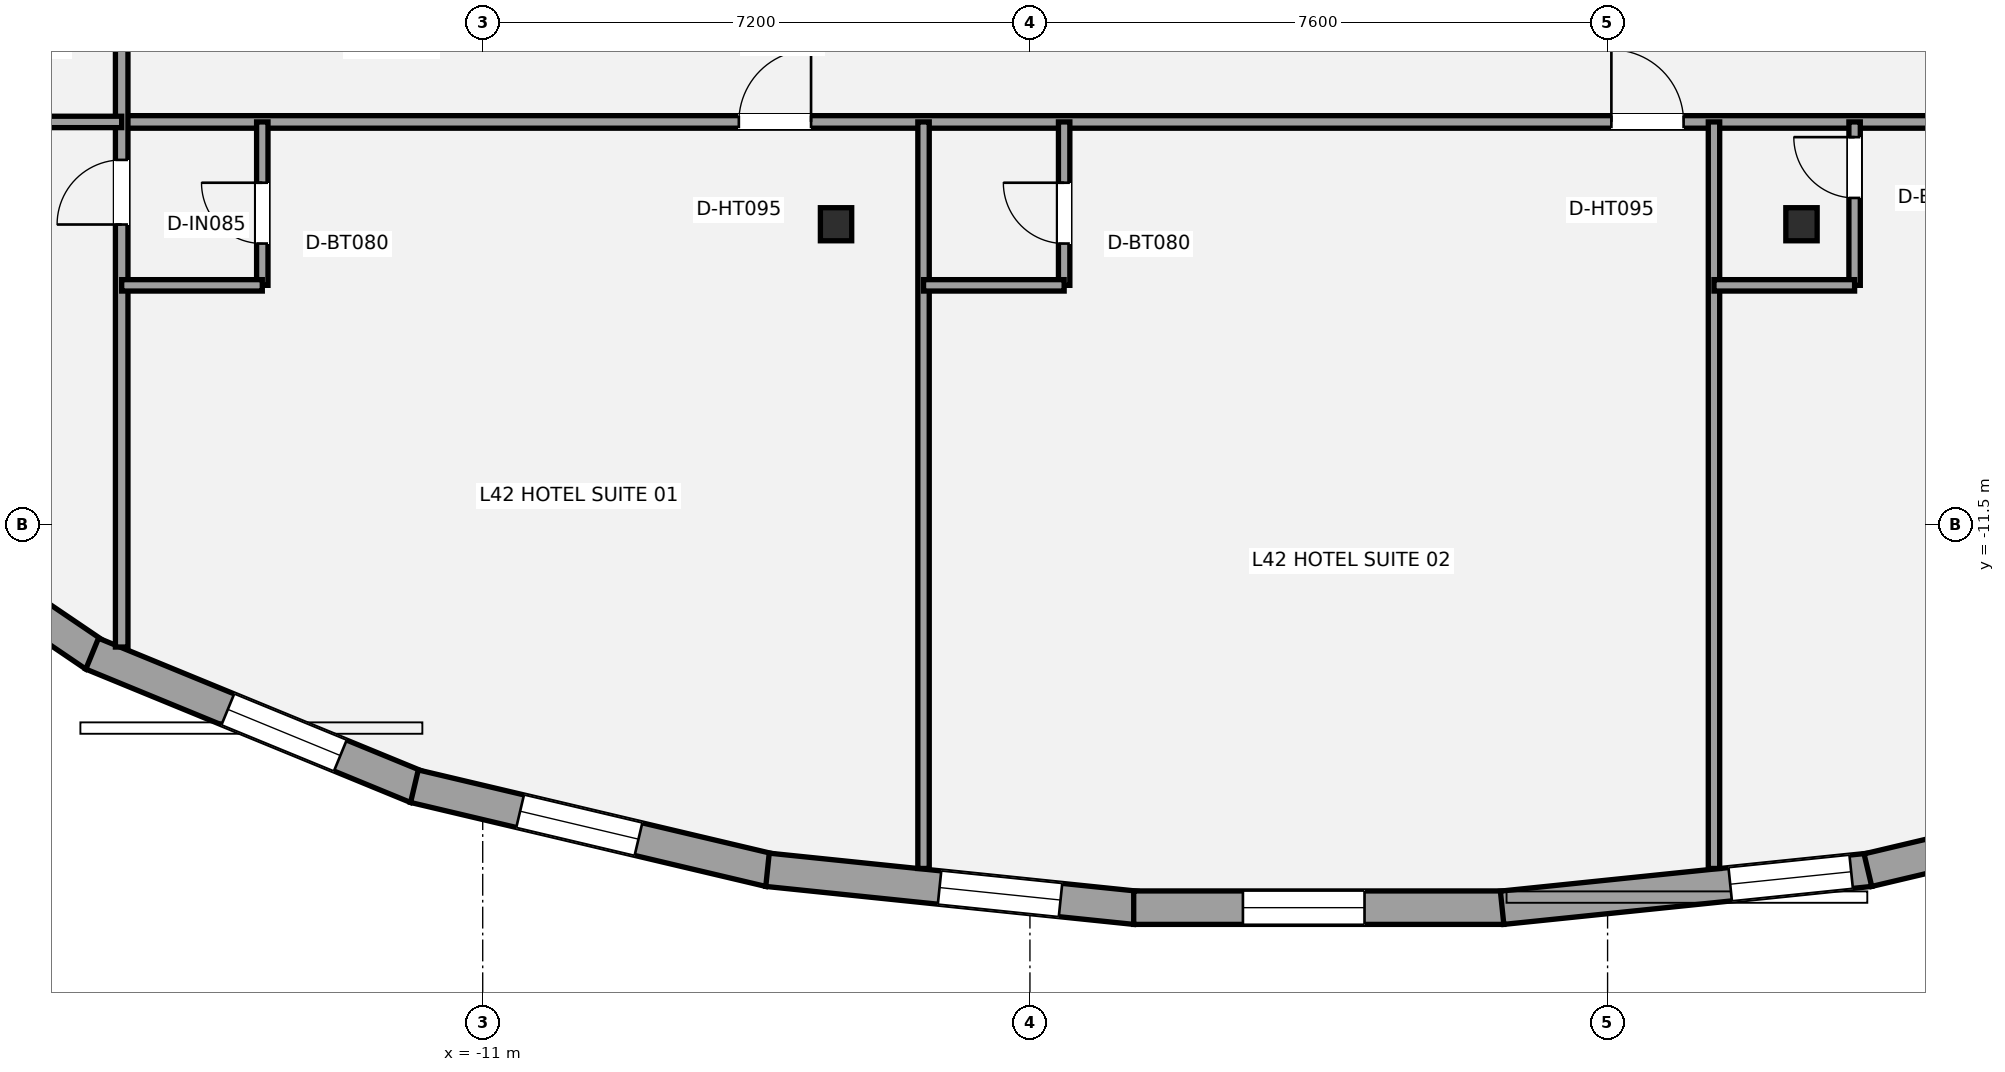
"""IFC4 building model, lengths in metres.
Left out: names, types, materials, properties, quantities, classifications, styles, units other than length and angle.
Written with IfcOpenShell. Run it as: python <this file> out.ifc"""

import sys

from ifc_helpers import new_model, si_unit, direction, frame, frame_2d, origin, origin_2d, place, context, subcontext, project, spatial, rectangle, i_section, extrude, element, fill, save


model = new_model("IFC4")
c1 = context("Model", 3, precision=1e-05, world=origin(), true_north=direction((0.0, 1.0)))
c2 = subcontext(c1, "Body", "Model", "MODEL_VIEW")
j1 = project(units=[si_unit("LENGTHUNIT", "METRE"), si_unit("PLANEANGLEUNIT", "RADIAN")], contexts=[c1])
p1 = place(None, origin())
s1 = spatial("IfcSite", under=j1, at=p1, CompositionType="ELEMENT")
p2 = place(p1, origin())
s2 = spatial("IfcBuilding", under=s1, at=p2, CompositionType="ELEMENT")
p3 = place(p2, frame((0.0, 0.0, 156.6)))
s3 = spatial("IfcBuildingStorey", under=s2, at=p3, CompositionType="ELEMENT", Elevation=156.6)
for number, where, z_axis, x_axis in (
    (1, (-6.351, -7.546, 0.0), (0.0, 0.0, 1.0), (1.0, 0.0, 0.0)),
    (2, (6.351, -7.546, 0.0), (0.0, 0.0, 1.0), (1.0, 0.0, 0.0)),
):
    element("IfcColumn", number, at=place(p3, frame(where, z_axis=z_axis, x_axis=x_axis)), inside=s3, PredefinedType="COLUMN", context=c2, shape_type="SweptSolid", body=[
        extrude(i_section(OverallWidth=0.412, OverallDepth=0.435, WebThickness=0.036, FlangeThickness=0.057, at=origin_2d()), origin(), (0.0, 0.0, 1.0), 3.2),
    ])
p4 = place(p3, frame((-16.099, -13.217, 0.0), z_axis=(0.0, 0.0, 1.0), x_axis=(-0.827771778383, 0.561064954272, 0.0)))
e3 = element("IfcWall", 3, at=p4, inside=s3, PredefinedType="STANDARD", context=c2, shape_type="SweptSolid", body=[
    extrude(rectangle(XDim=4.282, YDim=0.44, at=frame_2d((2.141, 0.0))), origin(), (0.0, 0.0, 1.0), 2.315),
])
p5 = place(p4, frame((1.54, 0.0, 0.58)))
e4 = element("IfcOpeningElement", 4, at=p5, cuts=e3, PredefinedType="OPENING", context=c2, shape_type="SweptSolid", body=[
    extrude(rectangle(XDim=1.6, YDim=1.55, at=frame_2d((0.8, 0.775))), frame((0.0, 0.23, 0.0), z_axis=(0.0, -1.0, 0.0), x_axis=(1.0, 0.0, 0.0)), (0.0, 0.0, 1.0), 0.46),
])
p6 = place(p3, frame((-11.865, -14.95, 0.0), z_axis=(0.0, 0.0, 1.0), x_axis=(-0.925044361302, 0.3798590918, 0.0)))
e5 = element("IfcWall", 5, at=p6, inside=s3, PredefinedType="STANDARD", context=c2, shape_type="SweptSolid", body=[
    extrude(rectangle(XDim=4.619, YDim=0.44, at=frame_2d((2.31, 0.0))), origin(), (0.0, 0.0, 1.0), 2.315),
])
p7 = place(p6, frame((1.09, 0.0, 0.58)))
e6 = element("IfcOpeningElement", 6, at=p7, cuts=e5, PredefinedType="OPENING", context=c2, shape_type="SweptSolid", body=[
    extrude(rectangle(XDim=1.6, YDim=1.55, at=frame_2d((0.8, 0.775))), frame((0.0, 0.23, 0.0), z_axis=(0.0, -1.0, 0.0), x_axis=(1.0, 0.0, 0.0)), (0.0, 0.0, 1.0), 0.46),
])
p8 = place(p3, frame((-7.225, -16.044, 0.0), z_axis=(0.0, 0.0, 1.0), x_axis=(-0.973201371538, 0.229954539936, 0.0)))
e7 = element("IfcWall", 7, at=p8, inside=s3, PredefinedType="STANDARD", context=c2, shape_type="SweptSolid", body=[
    extrude(rectangle(XDim=4.802, YDim=0.44, at=frame_2d((2.401, 0.0))), origin(), (0.0, 0.0, 1.0), 2.315),
])
p9 = place(p8, frame((1.773, 0.0, 0.58)))
e8 = element("IfcOpeningElement", 8, at=p9, cuts=e7, PredefinedType="OPENING", context=c2, shape_type="SweptSolid", body=[
    extrude(rectangle(XDim=1.6, YDim=1.55, at=frame_2d((0.8, 0.775))), frame((0.0, 0.23, 0.0), z_axis=(0.0, -1.0, 0.0), x_axis=(1.0, 0.0, 0.0)), (0.0, 0.0, 1.0), 0.46),
])
p10 = place(p3, frame((-2.412, -16.539, 0.0), z_axis=(0.0, 0.0, 1.0), x_axis=(-0.994718319881, 0.10264240884, 0.0)))
e9 = element("IfcWall", 9, at=p10, inside=s3, PredefinedType="STANDARD", context=c2, shape_type="SweptSolid", body=[
    extrude(rectangle(XDim=4.866, YDim=0.44, at=frame_2d((2.433, 0.0))), origin(), (0.0, 0.0, 1.0), 2.315),
])
p11 = place(p10, frame((0.991, 0.0, 0.58)))
e10 = element("IfcOpeningElement", 10, at=p11, cuts=e9, PredefinedType="OPENING", context=c2, shape_type="SweptSolid", body=[
    extrude(rectangle(XDim=1.6, YDim=1.55, at=frame_2d((0.8, 0.775))), frame((0.0, 0.23, 0.0), z_axis=(0.0, -1.0, 0.0), x_axis=(1.0, 0.0, 0.0)), (0.0, 0.0, 1.0), 0.46),
])
p12 = place(p3, frame((2.435, -16.537, 0.0), z_axis=(0.0, 0.0, 1.0), x_axis=(-1.0, 0.0, 0.0)))
e11 = element("IfcWall", 11, at=p12, inside=s3, PredefinedType="STANDARD", context=c2, shape_type="SweptSolid", body=[
    extrude(rectangle(XDim=4.87, YDim=0.44, at=frame_2d((2.435, 0.0))), origin(), (0.0, 0.0, 1.0), 2.315),
])
p13 = place(p12, frame((1.833, 0.0, 0.58)))
e12 = element("IfcOpeningElement", 12, at=p13, cuts=e11, PredefinedType="OPENING", context=c2, shape_type="SweptSolid", body=[
    extrude(rectangle(XDim=1.6, YDim=1.55, at=frame_2d((0.8, 0.775))), frame((0.0, 0.23, 0.0), z_axis=(0.0, -1.0, 0.0), x_axis=(1.0, 0.0, 0.0)), (0.0, 0.0, 1.0), 0.46),
])
p14 = place(p3, frame((7.253, -16.039, 0.0), z_axis=(0.0, 0.0, 1.0), x_axis=(-0.994718319881, -0.10264240884, 0.0)))
e13 = element("IfcWall", 13, at=p14, inside=s3, PredefinedType="STANDARD", context=c2, shape_type="SweptSolid", body=[
    extrude(rectangle(XDim=4.866, YDim=0.44, at=frame_2d((2.433, 0.0))), origin(), (0.0, 0.0, 1.0), 2.315),
])
p15 = place(p14, frame((0.25, 0.0, 0.58)))
e14 = element("IfcOpeningElement", 14, at=p15, cuts=e13, PredefinedType="OPENING", context=c2, shape_type="SweptSolid", body=[
    extrude(rectangle(XDim=1.6, YDim=1.55, at=frame_2d((0.8, 0.775))), frame((0.0, 0.23, 0.0), z_axis=(0.0, -1.0, 0.0), x_axis=(1.0, 0.0, 0.0)), (0.0, 0.0, 1.0), 0.46),
])
p16 = place(p3, frame((11.898, -14.939, 0.0), z_axis=(0.0, 0.0, 1.0), x_axis=(-0.973201371538, -0.229954539936, 0.0)))
e15 = element("IfcWall", 15, at=p16, inside=s3, PredefinedType="STANDARD", context=c2, shape_type="SweptSolid", body=[
    extrude(rectangle(XDim=4.802, YDim=0.44, at=frame_2d((2.401, 0.0))), origin(), (0.0, 0.0, 1.0), 2.315),
])
p17 = place(p16, frame((1.921, 0.0, 0.58)))
e16 = element("IfcOpeningElement", 16, at=p17, cuts=e15, PredefinedType="OPENING", context=c2, shape_type="SweptSolid", body=[
    extrude(rectangle(XDim=1.6, YDim=1.55, at=frame_2d((0.8, 0.775))), frame((0.0, 0.23, 0.0), z_axis=(0.0, -1.0, 0.0), x_axis=(1.0, 0.0, 0.0)), (0.0, 0.0, 1.0), 0.46),
])
p18 = place(p3, frame((-15.75, -6.2, 0.0), z_axis=(0.0, 0.0, 1.0), x_axis=(1.0, 0.0, 0.0)))
e17 = element("IfcWall", 17, at=p18, inside=s3, PredefinedType="PARTITIONING", context=c2, shape_type="SweptSolid", body=[
    extrude(rectangle(XDim=31.3, YDim=0.165, at=frame_2d((15.65, 0.0))), origin(), (0.0, 0.0, 1.0), 2.398),
])
p19 = place(p18, frame((8.12, 0.0, 0.0)))
e18 = element("IfcOpeningElement", 18, at=p19, cuts=e17, PredefinedType="OPENING", context=c2, shape_type="SweptSolid", body=[
    extrude(rectangle(XDim=0.95, YDim=2.15, at=frame_2d((0.475, 1.075))), frame((0.0, 0.093, 0.0), z_axis=(0.0, -1.0, 0.0), x_axis=(1.0, 0.0, 0.0)), (0.0, 0.0, 1.0), 0.185),
])
p20 = place(p18, frame((19.6, 0.0, 0.0)))
e19 = element("IfcOpeningElement", 19, at=p20, cuts=e17, PredefinedType="OPENING", context=c2, shape_type="SweptSolid", body=[
    extrude(rectangle(XDim=0.95, YDim=2.15, at=frame_2d((0.475, 1.075))), frame((0.0, 0.093, 0.0), z_axis=(0.0, -1.0, 0.0), x_axis=(1.0, 0.0, 0.0)), (0.0, 0.0, 1.0), 0.185),
])
p21 = place(p18, frame((29.95, 0.0, 0.0)))
e20 = element("IfcOpeningElement", 20, at=p21, cuts=e17, PredefinedType="OPENING", context=c2, shape_type="SweptSolid", body=[
    extrude(rectangle(XDim=0.95, YDim=2.15, at=frame_2d((0.475, 1.075))), frame((0.0, 0.093, 0.0), z_axis=(0.0, -1.0, 0.0), x_axis=(1.0, 0.0, 0.0)), (0.0, 0.0, 1.0), 0.185),
])
p22 = place(p3, frame((-15.75, -13.108, 0.0), z_axis=(0.0, 0.0, 1.0), x_axis=(0.0, 1.0, 0.0)))
e21 = element("IfcWall", 21, at=p22, inside=s3, PredefinedType="PARTITIONING", context=c2, shape_type="SweptSolid", body=[
    extrude(rectangle(XDim=20.658, YDim=0.165, at=frame_2d((10.329, 0.0))), origin(), (0.0, 0.0, 1.0), 2.473),
])
p23 = place(p22, frame((5.559, 0.0, 0.0)))
e22 = element("IfcOpeningElement", 22, at=p23, cuts=e21, PredefinedType="OPENING", context=c2, shape_type="SweptSolid", body=[
    extrude(rectangle(XDim=0.85, YDim=2.1, at=frame_2d((0.425, 1.05))), frame((0.0, 0.093, 0.0), z_axis=(0.0, -1.0, 0.0), x_axis=(1.0, 0.0, 0.0)), (0.0, 0.0, 1.0), 0.185),
])
p24 = place(p22, frame((9.959, 0.0, 0.0)))
e23 = element("IfcOpeningElement", 23, at=p24, cuts=e21, PredefinedType="OPENING", context=c2, shape_type="SweptSolid", body=[
    extrude(rectangle(XDim=0.95, YDim=2.15, at=frame_2d((0.475, 1.075))), frame((0.0, 0.093, 0.0), z_axis=(0.0, -1.0, 0.0), x_axis=(1.0, 0.0, 0.0)), (0.0, 0.0, 1.0), 0.185),
])
p25 = place(p22, frame((14.559, 0.0, 0.0)))
e24 = element("IfcOpeningElement", 24, at=p25, cuts=e21, PredefinedType="OPENING", context=c2, shape_type="SweptSolid", body=[
    extrude(rectangle(XDim=0.95, YDim=2.15, at=frame_2d((0.475, 1.075))), frame((0.0, 0.093, 0.0), z_axis=(0.0, -1.0, 0.0), x_axis=(1.0, 0.0, 0.0)), (0.0, 0.0, 1.0), 0.185),
])
p26 = place(p22, frame((19.309, 0.0, 0.0)))
e25 = element("IfcOpeningElement", 25, at=p26, cuts=e21, PredefinedType="OPENING", context=c2, shape_type="SweptSolid", body=[
    extrude(rectangle(XDim=0.95, YDim=2.15, at=frame_2d((0.475, 1.075))), frame((0.0, 0.093, 0.0), z_axis=(0.0, -1.0, 0.0), x_axis=(1.0, 0.0, 0.0)), (0.0, 0.0, 1.0), 0.185),
])
p27 = place(p3, frame((-22.828, -6.2, 0.0), z_axis=(0.0, 0.0, 1.0), x_axis=(1.0, 0.0, 0.0)))
e26 = element("IfcWall", 26, at=p27, inside=s3, PredefinedType="PLUMBINGWALL", context=c2, shape_type="SweptSolid", body=[
    extrude(rectangle(XDim=7.078, YDim=0.15, at=frame_2d((3.539, 0.0))), origin(), (0.0, 0.0, 1.0), 2.473),
])
for number, where, z_axis, x_axis in (
    (27, (-5.2, -16.022, 0.0), (0.0, 0.0, 1.0), (0.0, 1.0, 0.0)),
    (28, (5.2, -16.022, 0.0), (0.0, 0.0, 1.0), (0.0, 1.0, 0.0)),
):
    element("IfcWall", number, at=place(p3, frame(where, z_axis=z_axis, x_axis=x_axis)), inside=s3, PredefinedType="PLUMBINGWALL", context=c2, shape_type="SweptSolid", body=[
        extrude(rectangle(XDim=9.822, YDim=0.15, at=frame_2d((4.911, 0.0))), origin(), (0.0, 0.0, 1.0), 2.473),
    ])
p28 = place(p3, frame((-13.9, -8.35, 0.0), z_axis=(0.0, 0.0, 1.0), x_axis=(0.0, 1.0, 0.0)))
e29 = element("IfcWall", 29, at=p28, inside=s3, PredefinedType="PLUMBINGWALL", context=c2, shape_type="SweptSolid", body=[
    extrude(rectangle(XDim=2.15, YDim=0.15, at=frame_2d((1.075, 0.0))), origin(), (0.0, 0.0, 1.0), 3.02),
])
p29 = place(p28, frame((0.55, 0.0, 0.0)))
e30 = element("IfcOpeningElement", 30, at=p29, cuts=e29, PredefinedType="OPENING", context=c2, shape_type="SweptSolid", body=[
    extrude(rectangle(XDim=0.8, YDim=2.1, at=frame_2d((0.4, 1.05))), frame((0.0, 0.085, 0.0), z_axis=(0.0, -1.0, 0.0), x_axis=(1.0, 0.0, 0.0)), (0.0, 0.0, 1.0), 0.17),
])
p30 = place(p3, frame((-15.75, -8.35, 0.0), z_axis=(0.0, 0.0, 1.0), x_axis=(1.0, 0.0, 0.0)))
e31 = element("IfcWall", 31, at=p30, inside=s3, PredefinedType="PLUMBINGWALL", context=c2, shape_type="SweptSolid", body=[
    extrude(rectangle(XDim=1.85, YDim=0.15, at=frame_2d((0.925, 0.0))), origin(), (0.0, 0.0, 1.0), 2.473),
])
p31 = place(p3, frame((-3.35, -8.35, 0.0), z_axis=(0.0, 0.0, 1.0), x_axis=(0.0, 1.0, 0.0)))
e32 = element("IfcWall", 32, at=p31, inside=s3, PredefinedType="PLUMBINGWALL", context=c2, shape_type="SweptSolid", body=[
    extrude(rectangle(XDim=2.15, YDim=0.15, at=frame_2d((1.075, 0.0))), origin(), (0.0, 0.0, 1.0), 2.473),
])
p32 = place(p31, frame((0.55, 0.0, 0.0)))
e33 = element("IfcOpeningElement", 33, at=p32, cuts=e32, PredefinedType="OPENING", context=c2, shape_type="SweptSolid", body=[
    extrude(rectangle(XDim=0.8, YDim=2.1, at=frame_2d((0.4, 1.05))), frame((0.0, 0.085, 0.0), z_axis=(0.0, -1.0, 0.0), x_axis=(1.0, 0.0, 0.0)), (0.0, 0.0, 1.0), 0.17),
])
p33 = place(p3, frame((-5.2, -8.35, 0.0), z_axis=(0.0, 0.0, 1.0), x_axis=(1.0, 0.0, 0.0)))
e34 = element("IfcWall", 34, at=p33, inside=s3, PredefinedType="PLUMBINGWALL", context=c2, shape_type="SweptSolid", body=[
    extrude(rectangle(XDim=1.85, YDim=0.15, at=frame_2d((0.925, 0.0))), origin(), (0.0, 0.0, 1.0), 3.02),
])
p34 = place(p3, frame((7.05, -8.35, 0.0), z_axis=(0.0, 0.0, 1.0), x_axis=(0.0, 1.0, 0.0)))
e35 = element("IfcWall", 35, at=p34, inside=s3, PredefinedType="PLUMBINGWALL", context=c2, shape_type="SweptSolid", body=[
    extrude(rectangle(XDim=2.15, YDim=0.15, at=frame_2d((1.075, 0.0))), origin(), (0.0, 0.0, 1.0), 3.02),
])
p35 = place(p34, frame((1.15, 0.0, 0.0)))
e36 = element("IfcOpeningElement", 36, at=p35, cuts=e35, PredefinedType="OPENING", context=c2, shape_type="SweptSolid", body=[
    extrude(rectangle(XDim=0.8, YDim=2.1, at=frame_2d((0.4, 1.05))), frame((0.0, 0.085, 0.0), z_axis=(0.0, -1.0, 0.0), x_axis=(1.0, 0.0, 0.0)), (0.0, 0.0, 1.0), 0.17),
])
p36 = place(p3, frame((5.2, -8.35, 0.0), z_axis=(0.0, 0.0, 1.0), x_axis=(1.0, 0.0, 0.0)))
e37 = element("IfcWall", 37, at=p36, inside=s3, PredefinedType="PLUMBINGWALL", context=c2, shape_type="SweptSolid", body=[
    extrude(rectangle(XDim=1.85, YDim=0.15, at=frame_2d((0.925, 0.0))), origin(), (0.0, 0.0, 1.0), 3.02),
])
p37 = place(p7, origin())
e38 = element("IfcWindow", 38, at=p37, inside=s3, PartitioningType="SINGLE_PANEL", PredefinedType="WINDOW", context=c2, shape_type="SweptSolid", body=[
    extrude(rectangle(XDim=1.6, YDim=1.55, at=frame_2d((0.8, 0.775))), frame((0.0, -0.01, 0.0), z_axis=(0.0, -1.0, 0.0), x_axis=(1.0, 0.0, 0.0)), (0.0, 0.0, 1.0), 0.06),
])
fill(e6, e38)
p38 = place(p9, origin())
e39 = element("IfcWindow", 39, at=p38, inside=s3, PartitioningType="SINGLE_PANEL", PredefinedType="WINDOW", context=c2, shape_type="SweptSolid", body=[
    extrude(rectangle(XDim=1.6, YDim=1.55, at=frame_2d((0.8, 0.775))), frame((0.0, -0.01, 0.0), z_axis=(0.0, -1.0, 0.0), x_axis=(1.0, 0.0, 0.0)), (0.0, 0.0, 1.0), 0.06),
])
fill(e8, e39)
p39 = place(p11, origin())
e40 = element("IfcWindow", 40, at=p39, inside=s3, PartitioningType="SINGLE_PANEL", PredefinedType="WINDOW", context=c2, shape_type="SweptSolid", body=[
    extrude(rectangle(XDim=1.6, YDim=1.55, at=frame_2d((0.8, 0.775))), frame((0.0, -0.01, 0.0), z_axis=(0.0, -1.0, 0.0), x_axis=(1.0, 0.0, 0.0)), (0.0, 0.0, 1.0), 0.06),
])
fill(e10, e40)
p40 = place(p13, origin())
e41 = element("IfcWindow", 41, at=p40, inside=s3, PartitioningType="SINGLE_PANEL", PredefinedType="WINDOW", context=c2, shape_type="SweptSolid", body=[
    extrude(rectangle(XDim=1.6, YDim=1.55, at=frame_2d((0.8, 0.775))), frame((0.0, -0.01, 0.0), z_axis=(0.0, -1.0, 0.0), x_axis=(1.0, 0.0, 0.0)), (0.0, 0.0, 1.0), 0.06),
])
fill(e12, e41)
p41 = place(p15, origin())
e42 = element("IfcWindow", 42, at=p41, inside=s3, PartitioningType="SINGLE_PANEL", PredefinedType="WINDOW", context=c2, shape_type="SweptSolid", body=[
    extrude(rectangle(XDim=1.6, YDim=1.55, at=frame_2d((0.8, 0.775))), frame((0.0, -0.01, 0.0), z_axis=(0.0, -1.0, 0.0), x_axis=(1.0, 0.0, 0.0)), (0.0, 0.0, 1.0), 0.06),
])
fill(e14, e42)
p42 = place(p23, origin())
e43 = element("IfcDoor", 43, at=p42, inside=s3, OperationType="SINGLE_SWING_LEFT", PredefinedType="DOOR", context=c2, shape_type="SweptSolid", body=[
    extrude(rectangle(XDim=0.85, YDim=2.1, at=frame_2d((0.425, 1.05))), frame((0.0, 0.025, 0.0), z_axis=(0.0, -1.0, 0.0), x_axis=(1.0, 0.0, 0.0)), (0.0, 0.0, 1.0), 0.05),
])
fill(e22, e43)
p43 = place(p19, origin())
e44 = element("IfcDoor", 44, at=p43, inside=s3, OperationType="SINGLE_SWING_RIGHT", PredefinedType="DOOR", context=c2, shape_type="SweptSolid", body=[
    extrude(rectangle(XDim=0.95, YDim=2.15, at=frame_2d((0.475, 1.075))), frame((0.0, 0.025, 0.0), z_axis=(0.0, -1.0, 0.0), x_axis=(1.0, 0.0, 0.0)), (0.0, 0.0, 1.0), 0.05),
])
fill(e18, e44)
p44 = place(p29, origin())
e45 = element("IfcDoor", 45, at=p44, inside=s3, OperationType="SINGLE_SWING_RIGHT", PredefinedType="DOOR", context=c2, shape_type="SweptSolid", body=[
    extrude(rectangle(XDim=0.8, YDim=2.1, at=frame_2d((0.4, 1.05))), frame((0.0, 0.025, 0.0), z_axis=(0.0, -1.0, 0.0), x_axis=(1.0, 0.0, 0.0)), (0.0, 0.0, 1.0), 0.05),
])
fill(e30, e45)
p45 = place(p20, origin())
e46 = element("IfcDoor", 46, at=p45, inside=s3, OperationType="SINGLE_SWING_LEFT", PredefinedType="DOOR", context=c2, shape_type="SweptSolid", body=[
    extrude(rectangle(XDim=0.95, YDim=2.15, at=frame_2d((0.475, 1.075))), frame((0.0, 0.025, 0.0), z_axis=(0.0, -1.0, 0.0), x_axis=(1.0, 0.0, 0.0)), (0.0, 0.0, 1.0), 0.05),
])
fill(e19, e46)
p46 = place(p32, origin())
e47 = element("IfcDoor", 47, at=p46, inside=s3, OperationType="SINGLE_SWING_RIGHT", PredefinedType="DOOR", context=c2, shape_type="SweptSolid", body=[
    extrude(rectangle(XDim=0.8, YDim=2.1, at=frame_2d((0.4, 1.05))), frame((0.0, 0.025, 0.0), z_axis=(0.0, -1.0, 0.0), x_axis=(1.0, 0.0, 0.0)), (0.0, 0.0, 1.0), 0.05),
])
fill(e33, e47)
p47 = place(p35, origin())
e48 = element("IfcDoor", 48, at=p47, inside=s3, OperationType="SINGLE_SWING_RIGHT", PredefinedType="DOOR", context=c2, shape_type="SweptSolid", body=[
    extrude(rectangle(XDim=0.8, YDim=2.1, at=frame_2d((0.4, 1.05))), frame((0.0, 0.025, 0.0), z_axis=(0.0, -1.0, 0.0), x_axis=(1.0, 0.0, 0.0)), (0.0, 0.0, 1.0), 0.05),
])
fill(e36, e48)
save(model, sys.argv[1])
